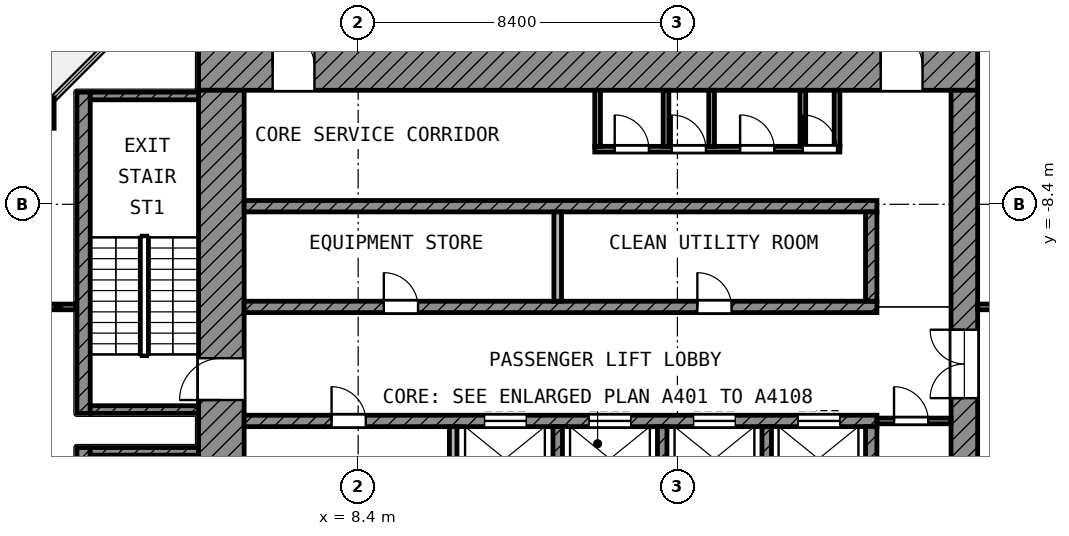
"""IFC4 building model, lengths in metres.
Left out: names, types, materials, properties, quantities, classifications, styles, units other than length and angle.
Written with IfcOpenShell. Run it as: python <this file> out.ifc"""

import sys

from ifc_helpers import new_model, si_unit, direction, frame, frame_2d, origin, origin_2d, place, context, subcontext, project, spatial, rectangle, extrude, element, fill, save


model = new_model("IFC4")
c1 = context("Model", 3, precision=1e-05, world=origin(), true_north=direction((0.0, 1.0)))
c2 = subcontext(c1, "Body", "Model", "MODEL_VIEW")
j1 = project(units=[si_unit("LENGTHUNIT", "METRE"), si_unit("PLANEANGLEUNIT", "RADIAN")], contexts=[c1])
p1 = place(None, origin())
s1 = spatial("IfcSite", under=j1, at=p1, CompositionType="ELEMENT")
p2 = place(p1, origin())
s2 = spatial("IfcBuilding", under=s1, at=p2, CompositionType="ELEMENT")
p3 = place(p2, frame((0.0, 0.0, 319.6)))
s3 = spatial("IfcBuildingStorey", under=s2, at=p3, CompositionType="ELEMENT", Elevation=319.6)
p4 = place(p3, frame((0.0, -6.0, 0.0), z_axis=(0.0, 0.0, 1.0), x_axis=(1.0, 0.0, 0.0)))
e1 = element("IfcColumn", 1, at=p4, inside=s3, PredefinedType="COLUMN", context=c2, shape_type="SweptSolid", body=[
    extrude(rectangle(XDim=0.8, YDim=0.8, at=origin_2d()), origin(), (0.0, 0.0, 1.0), 4.2),
])
p5 = place(p3, frame((4.2, -4.8, 0.0), z_axis=(0.0, 0.0, 1.0), x_axis=(1.0, 0.0, 0.0)))
e2 = element("IfcWall", 2, at=p5, inside=s3, PredefinedType="SHEAR", context=c2, shape_type="SweptSolid", body=[
    extrude(rectangle(XDim=20.5, YDim=1.2, at=frame_2d((10.25, 0.0))), origin(), (0.0, 0.0, 1.0), 3.6),
])
p6 = place(p5, frame((1.95, 0.0, 0.0)))
e3 = element("IfcOpeningElement", 3, at=p6, cuts=e2, PredefinedType="OPENING", context=c2, shape_type="SweptSolid", body=[
    extrude(rectangle(XDim=1.1, YDim=2.1, at=frame_2d((0.55, 1.05))), frame((0.0, 0.61, 0.0), z_axis=(0.0, -1.0, 0.0), x_axis=(1.0, 0.0, 0.0)), (0.0, 0.0, 1.0), 1.22),
])
p7 = place(p5, frame((17.95, 0.0, 0.0)))
e4 = element("IfcOpeningElement", 4, at=p7, cuts=e2, PredefinedType="OPENING", context=c2, shape_type="SweptSolid", body=[
    extrude(rectangle(XDim=1.1, YDim=2.1, at=frame_2d((0.55, 1.05))), frame((0.0, 0.61, 0.0), z_axis=(0.0, -1.0, 0.0), x_axis=(1.0, 0.0, 0.0)), (0.0, 0.0, 1.0), 1.22),
])
p8 = place(p3, frame((4.8, -24.7, 0.0), z_axis=(0.0, 0.0, 1.0), x_axis=(0.0, 1.0, 0.0)))
e5 = element("IfcWall", 5, at=p8, inside=s3, PredefinedType="SHEAR", context=c2, shape_type="SweptSolid", body=[
    extrude(rectangle(XDim=19.3, YDim=1.2, at=frame_2d((9.65, 0.0))), origin(), (0.0, 0.0, 1.0), 3.6),
])
p9 = place(p8, frame((11.15, 0.0, 0.0)))
e6 = element("IfcOpeningElement", 6, at=p9, cuts=e5, PredefinedType="OPENING", context=c2, shape_type="SweptSolid", body=[
    extrude(rectangle(XDim=1.1, YDim=2.1, at=frame_2d((0.55, 1.05))), frame((0.0, 0.61, 0.0), z_axis=(0.0, -1.0, 0.0), x_axis=(1.0, 0.0, 0.0)), (0.0, 0.0, 1.0), 1.22),
])
p10 = place(p8, frame((1.85, 0.0, 0.0)))
e7 = element("IfcOpeningElement", 7, at=p10, cuts=e5, PredefinedType="OPENING", context=c2, shape_type="SweptSolid", body=[
    extrude(rectangle(XDim=1.1, YDim=2.1, at=frame_2d((0.55, 1.05))), frame((0.0, 0.61, 0.0), z_axis=(0.0, -1.0, 0.0), x_axis=(1.0, 0.0, 0.0)), (0.0, 0.0, 1.0), 1.22),
])
p11 = place(p3, frame((24.35, -24.0, 0.0), z_axis=(0.0, 0.0, 1.0), x_axis=(0.0, 1.0, 0.0)))
e8 = element("IfcWall", 8, at=p11, inside=s3, PredefinedType="SHEAR", context=c2, shape_type="SweptSolid", body=[
    extrude(rectangle(XDim=18.6, YDim=0.7, at=frame_2d((9.3, 0.0))), origin(), (0.0, 0.0, 1.0), 3.6),
])
p12 = place(p11, frame((10.5, 0.0, 0.0)))
e9 = element("IfcOpeningElement", 9, at=p12, cuts=e8, PredefinedType="OPENING", context=c2, shape_type="SweptSolid", body=[
    extrude(rectangle(XDim=1.8, YDim=2.1, at=frame_2d((0.9, 1.05))), frame((0.0, 0.36, 0.0), z_axis=(0.0, -1.0, 0.0), x_axis=(1.0, 0.0, 0.0)), (0.0, 0.0, 1.0), 0.72),
])
p13 = place(p3, frame((5.4, -8.45, 0.0), z_axis=(0.0, 0.0, 1.0), x_axis=(1.0, 0.0, 0.0)))
e10 = element("IfcWall", 10, at=p13, inside=s3, PredefinedType="SHEAR", context=c2, shape_type="SweptSolid", body=[
    extrude(rectangle(XDim=16.65, YDim=0.3, at=frame_2d((8.325, 0.0))), origin(), (0.0, 0.0, 1.0), 3.6),
])
p14 = place(p3, frame((5.4, -11.1, 0.0), z_axis=(0.0, 0.0, 1.0), x_axis=(1.0, 0.0, 0.0)))
e11 = element("IfcWall", 11, at=p14, inside=s3, PredefinedType="SHEAR", context=c2, shape_type="SweptSolid", body=[
    extrude(rectangle(XDim=16.65, YDim=0.3, at=frame_2d((8.325, 0.0))), origin(), (0.0, 0.0, 1.0), 3.6),
])
p15 = place(p14, frame((3.675, 0.0, 0.0)))
e12 = element("IfcOpeningElement", 12, at=p15, cuts=e11, PredefinedType="OPENING", context=c2, shape_type="SweptSolid", body=[
    extrude(rectangle(XDim=0.9, YDim=2.1, at=frame_2d((0.45, 1.05))), frame((0.0, 0.16, 0.0), z_axis=(0.0, -1.0, 0.0), x_axis=(1.0, 0.0, 0.0)), (0.0, 0.0, 1.0), 0.32),
])
p16 = place(p14, frame((11.925, 0.0, 0.0)))
e13 = element("IfcOpeningElement", 13, at=p16, cuts=e11, PredefinedType="OPENING", context=c2, shape_type="SweptSolid", body=[
    extrude(rectangle(XDim=0.9, YDim=2.1, at=frame_2d((0.45, 1.05))), frame((0.0, 0.16, 0.0), z_axis=(0.0, -1.0, 0.0), x_axis=(1.0, 0.0, 0.0)), (0.0, 0.0, 1.0), 0.32),
])
p17 = place(p3, frame((5.4, -14.1, 0.0), z_axis=(0.0, 0.0, 1.0), x_axis=(1.0, 0.0, 0.0)))
e14 = element("IfcWall", 14, at=p17, inside=s3, PredefinedType="SHEAR", context=c2, shape_type="SweptSolid", body=[
    extrude(rectangle(XDim=16.65, YDim=0.3, at=frame_2d((8.325, 0.0))), origin(), (0.0, 0.0, 1.0), 3.6),
])
p18 = place(p17, frame((6.325, 0.0, 0.0)))
e15 = element("IfcOpeningElement", 15, at=p18, cuts=e14, PredefinedType="OPENING", context=c2, shape_type="SweptSolid", body=[
    extrude(rectangle(XDim=1.1, YDim=2.1, at=frame_2d((0.55, 1.05))), frame((0.0, 0.16, 0.0), z_axis=(0.0, -1.0, 0.0), x_axis=(1.0, 0.0, 0.0)), (0.0, 0.0, 1.0), 0.32),
])
p19 = place(p17, frame((9.075, 0.0, 0.0)))
e16 = element("IfcOpeningElement", 16, at=p19, cuts=e14, PredefinedType="OPENING", context=c2, shape_type="SweptSolid", body=[
    extrude(rectangle(XDim=1.1, YDim=2.1, at=frame_2d((0.55, 1.05))), frame((0.0, 0.16, 0.0), z_axis=(0.0, -1.0, 0.0), x_axis=(1.0, 0.0, 0.0)), (0.0, 0.0, 1.0), 0.32),
])
p20 = place(p17, frame((11.825, 0.0, 0.0)))
e17 = element("IfcOpeningElement", 17, at=p20, cuts=e14, PredefinedType="OPENING", context=c2, shape_type="SweptSolid", body=[
    extrude(rectangle(XDim=1.1, YDim=2.1, at=frame_2d((0.55, 1.05))), frame((0.0, 0.16, 0.0), z_axis=(0.0, -1.0, 0.0), x_axis=(1.0, 0.0, 0.0)), (0.0, 0.0, 1.0), 0.32),
])
p21 = place(p17, frame((14.575, 0.0, 0.0)))
e18 = element("IfcOpeningElement", 18, at=p21, cuts=e14, PredefinedType="OPENING", context=c2, shape_type="SweptSolid", body=[
    extrude(rectangle(XDim=1.1, YDim=2.1, at=frame_2d((0.55, 1.05))), frame((0.0, 0.16, 0.0), z_axis=(0.0, -1.0, 0.0), x_axis=(1.0, 0.0, 0.0)), (0.0, 0.0, 1.0), 0.32),
])
p22 = place(p17, frame((2.3, 0.0, 0.0)))
e19 = element("IfcOpeningElement", 19, at=p22, cuts=e14, PredefinedType="OPENING", context=c2, shape_type="SweptSolid", body=[
    extrude(rectangle(XDim=0.9, YDim=2.1, at=frame_2d((0.45, 1.05))), frame((0.0, 0.16, 0.0), z_axis=(0.0, -1.0, 0.0), x_axis=(1.0, 0.0, 0.0)), (0.0, 0.0, 1.0), 0.32),
])
p23 = place(p3, frame((21.9, -10.95, 0.0), z_axis=(0.0, 0.0, 1.0), x_axis=(0.0, 1.0, 0.0)))
e20 = element("IfcWall", 20, at=p23, inside=s3, PredefinedType="SHEAR", context=c2, shape_type="SweptSolid", body=[
    extrude(rectangle(XDim=2.35, YDim=0.3, at=frame_2d((1.175, 0.0))), origin(), (0.0, 0.0, 1.0), 3.6),
])
p24 = place(p3, frame((21.9, -16.6, 0.0), z_axis=(0.0, 0.0, 1.0), x_axis=(0.0, 1.0, 0.0)))
e21 = element("IfcWall", 21, at=p24, inside=s3, PredefinedType="SHEAR", context=c2, shape_type="SweptSolid", body=[
    extrude(rectangle(XDim=2.35, YDim=0.3, at=frame_2d((1.175, 0.0))), origin(), (0.0, 0.0, 1.0), 3.6),
])
p25 = place(p3, frame((13.65, -10.95, 0.0), z_axis=(0.0, 0.0, 1.0), x_axis=(0.0, 1.0, 0.0)))
e22 = element("IfcWall", 22, at=p25, inside=s3, PredefinedType="PARTITIONING", context=c2, shape_type="SweptSolid", body=[
    extrude(rectangle(XDim=2.35, YDim=0.2, at=frame_2d((1.175, 0.0))), origin(), (0.0, 0.0, 1.0), 3.6),
])
p26 = place(p3, frame((10.9, -16.6, 0.0), z_axis=(0.0, 0.0, 1.0), x_axis=(0.0, 1.0, 0.0)))
e23 = element("IfcWall", 23, at=p26, inside=s3, PredefinedType="PARTITIONING", context=c2, shape_type="SweptSolid", body=[
    extrude(rectangle(XDim=2.35, YDim=0.2, at=frame_2d((1.175, 0.0))), origin(), (0.0, 0.0, 1.0), 3.6),
])
for number, where, z_axis, x_axis in (
    (24, (13.65, -16.6, 0.0), (0.0, 0.0, 1.0), (0.0, 1.0, 0.0)),
    (25, (16.4, -16.6, 0.0), (0.0, 0.0, 1.0), (0.0, 1.0, 0.0)),
    (26, (19.15, -16.6, 0.0), (0.0, 0.0, 1.0), (0.0, 1.0, 0.0)),
):
    element("IfcWall", number, at=place(p3, frame(where, z_axis=z_axis, x_axis=x_axis)), inside=s3, PredefinedType="SHEAR", context=c2, shape_type="SweptSolid", body=[
        extrude(rectangle(XDim=2.35, YDim=0.25, at=frame_2d((1.175, 0.0))), origin(), (0.0, 0.0, 1.0), 3.6),
    ])
p27 = place(p3, frame((22.05, -14.1, 0.0), z_axis=(0.0, 0.0, 1.0), x_axis=(1.0, 0.0, 0.0)))
e27 = element("IfcWall", 27, at=p27, inside=s3, PredefinedType="PARTITIONING", context=c2, shape_type="SweptSolid", body=[
    extrude(rectangle(XDim=1.95, YDim=0.15, at=frame_2d((0.975, 0.0))), origin(), (0.0, 0.0, 1.0), 3.6),
])
p28 = place(p27, frame((0.45, 0.0, 0.0)))
e28 = element("IfcOpeningElement", 28, at=p28, cuts=e27, PredefinedType="OPENING", context=c2, shape_type="SweptSolid", body=[
    extrude(rectangle(XDim=0.9, YDim=2.1, at=frame_2d((0.45, 1.05))), frame((0.0, 0.085, 0.0), z_axis=(0.0, -1.0, 0.0), x_axis=(1.0, 0.0, 0.0)), (0.0, 0.0, 1.0), 0.17),
])
p29 = place(p3, frame((14.625, -6.95, 0.0), z_axis=(0.0, 0.0, 1.0), x_axis=(1.0, 0.0, 0.0)))
e29 = element("IfcWall", 29, at=p29, inside=s3, PredefinedType="PARTITIONING", context=c2, shape_type="SweptSolid", body=[
    extrude(rectangle(XDim=6.45, YDim=0.15, at=frame_2d((3.225, 0.0))), origin(), (0.0, 0.0, 1.0), 3.6),
])
p30 = place(p29, frame((0.525, 0.0, 0.0)))
e30 = element("IfcOpeningElement", 30, at=p30, cuts=e29, PredefinedType="OPENING", context=c2, shape_type="SweptSolid", body=[
    extrude(rectangle(XDim=0.9, YDim=2.1, at=frame_2d((0.45, 1.05))), frame((0.0, 0.085, 0.0), z_axis=(0.0, -1.0, 0.0), x_axis=(1.0, 0.0, 0.0)), (0.0, 0.0, 1.0), 0.17),
])
p31 = place(p29, frame((2.025, 0.0, 0.0)))
e31 = element("IfcOpeningElement", 31, at=p31, cuts=e29, PredefinedType="OPENING", context=c2, shape_type="SweptSolid", body=[
    extrude(rectangle(XDim=0.9, YDim=2.1, at=frame_2d((0.45, 1.05))), frame((0.0, 0.085, 0.0), z_axis=(0.0, -1.0, 0.0), x_axis=(1.0, 0.0, 0.0)), (0.0, 0.0, 1.0), 0.17),
])
p32 = place(p29, frame((3.825, 0.0, 0.0)))
e32 = element("IfcOpeningElement", 32, at=p32, cuts=e29, PredefinedType="OPENING", context=c2, shape_type="SweptSolid", body=[
    extrude(rectangle(XDim=0.9, YDim=2.1, at=frame_2d((0.45, 1.05))), frame((0.0, 0.085, 0.0), z_axis=(0.0, -1.0, 0.0), x_axis=(1.0, 0.0, 0.0)), (0.0, 0.0, 1.0), 0.17),
])
p33 = place(p29, frame((5.475, 0.0, 0.0)))
e33 = element("IfcOpeningElement", 33, at=p33, cuts=e29, PredefinedType="OPENING", context=c2, shape_type="SweptSolid", body=[
    extrude(rectangle(XDim=0.9, YDim=2.1, at=frame_2d((0.45, 1.05))), frame((0.0, 0.085, 0.0), z_axis=(0.0, -1.0, 0.0), x_axis=(1.0, 0.0, 0.0)), (0.0, 0.0, 1.0), 0.17),
])
for number, where, z_axis, x_axis in (
    (34, (14.7, -6.875, 0.0), (0.0, 0.0, 1.0), (0.0, 1.0, 0.0)),
    (35, (16.5, -6.875, 0.0), (0.0, 0.0, 1.0), (0.0, 1.0, 0.0)),
    (36, (17.7, -6.875, 0.0), (0.0, 0.0, 1.0), (0.0, 1.0, 0.0)),
    (37, (20.1, -6.875, 0.0), (0.0, 0.0, 1.0), (0.0, 1.0, 0.0)),
    (38, (21.0, -6.875, 0.0), (0.0, 0.0, 1.0), (0.0, 1.0, 0.0)),
):
    element("IfcWall", number, at=place(p3, frame(where, z_axis=z_axis, x_axis=x_axis)), inside=s3, PredefinedType="PARTITIONING", context=c2, shape_type="SweptSolid", body=[
        extrude(rectangle(XDim=1.475, YDim=0.15, at=frame_2d((0.738, 0.0))), origin(), (0.0, 0.0, 1.0), 3.6),
    ])
p34 = place(p3, frame((1.175, -13.9, 0.0), z_axis=(0.0, 0.0, 1.0), x_axis=(0.0, 1.0, 0.0)))
e39 = element("IfcWall", 39, at=p34, inside=s3, PredefinedType="SHEAR", context=c2, shape_type="SweptSolid", body=[
    extrude(rectangle(XDim=8.45, YDim=0.35, at=frame_2d((4.225, 0.0))), origin(), (0.0, 0.0, 1.0), 3.6),
])
for number, where, z_axis, x_axis in (
    (40, (1.35, -5.55, 0.0), (0.0, 0.0, 1.0), (1.0, 0.0, 0.0)),
    (41, (1.35, -13.8, 0.0), (0.0, 0.0, 1.0), (1.0, 0.0, 0.0)),
):
    element("IfcWall", number, at=place(p3, frame(where, z_axis=z_axis, x_axis=x_axis)), inside=s3, PredefinedType="SHEAR", context=c2, shape_type="SweptSolid", body=[
        extrude(rectangle(XDim=2.85, YDim=0.2, at=frame_2d((1.425, 0.0))), origin(), (0.0, 0.0, 1.0), 3.6),
    ])
p35 = place(p3, frame((1.175, -23.25, 0.0), z_axis=(0.0, 0.0, 1.0), x_axis=(0.0, 1.0, 0.0)))
e42 = element("IfcWall", 42, at=p35, inside=s3, PredefinedType="SHEAR", context=c2, shape_type="SweptSolid", body=[
    extrude(rectangle(XDim=8.45, YDim=0.35, at=frame_2d((4.225, 0.0))), origin(), (0.0, 0.0, 1.0), 3.6),
])
p36 = place(p3, frame((1.35, -14.9, 0.0), z_axis=(0.0, 0.0, 1.0), x_axis=(1.0, 0.0, 0.0)))
e43 = element("IfcWall", 43, at=p36, inside=s3, PredefinedType="SHEAR", context=c2, shape_type="SweptSolid", body=[
    extrude(rectangle(XDim=2.85, YDim=0.2, at=frame_2d((1.425, 0.0))), origin(), (0.0, 0.0, 1.0), 3.6),
])
p37 = place(p3, frame((0.08, -11.1, 0.0), z_axis=(0.0, 0.0, 1.0), x_axis=(1.0, 0.0, 0.0)))
e44 = element("IfcWall", 44, at=p37, inside=s3, PredefinedType="PARTITIONING", context=c2, shape_type="SweptSolid", body=[
    extrude(rectangle(XDim=0.89, YDim=0.15, at=frame_2d((0.445, 0.0))), origin(), (0.0, 0.0, 1.0), 2.7),
])
p38 = place(p3, frame((24.7, -11.1, 0.0), z_axis=(0.0, 0.0, 1.0), x_axis=(1.0, 0.0, 0.0)))
e45 = element("IfcWall", 45, at=p38, inside=s3, PredefinedType="PARTITIONING", context=c2, shape_type="SweptSolid", body=[
    extrude(rectangle(XDim=4.625, YDim=0.15, at=frame_2d((2.312, 0.0))), origin(), (0.0, 0.0, 1.0), 3.6),
])
p39 = place(p38, frame((2.0, 0.0, 0.0)))
e46 = element("IfcOpeningElement", 46, at=p39, cuts=e45, PredefinedType="OPENING", context=c2, shape_type="SweptSolid", body=[
    extrude(rectangle(XDim=1.2, YDim=2.1, at=frame_2d((0.6, 1.05))), frame((0.0, 0.085, 0.0), z_axis=(0.0, -1.0, 0.0), x_axis=(1.0, 0.0, 0.0)), (0.0, 0.0, 1.0), 0.17),
])
p40 = place(p18, origin())
e47 = element("IfcDoor", 47, at=p40, inside=s3, OperationType="DOUBLE_DOOR_SLIDING", PredefinedType="DOOR", context=c2, shape_type="SweptSolid", body=[
    extrude(rectangle(XDim=1.1, YDim=2.1, at=frame_2d((0.55, 1.05))), frame((0.0, 0.025, 0.0), z_axis=(0.0, -1.0, 0.0), x_axis=(1.0, 0.0, 0.0)), (0.0, 0.0, 1.0), 0.05),
])
fill(e15, e47)
p41 = place(p19, origin())
e48 = element("IfcDoor", 48, at=p41, inside=s3, OperationType="DOUBLE_DOOR_SLIDING", PredefinedType="DOOR", context=c2, shape_type="SweptSolid", body=[
    extrude(rectangle(XDim=1.1, YDim=2.1, at=frame_2d((0.55, 1.05))), frame((0.0, 0.025, 0.0), z_axis=(0.0, -1.0, 0.0), x_axis=(1.0, 0.0, 0.0)), (0.0, 0.0, 1.0), 0.05),
])
fill(e16, e48)
p42 = place(p20, origin())
e49 = element("IfcDoor", 49, at=p42, inside=s3, OperationType="DOUBLE_DOOR_SLIDING", PredefinedType="DOOR", context=c2, shape_type="SweptSolid", body=[
    extrude(rectangle(XDim=1.1, YDim=2.1, at=frame_2d((0.55, 1.05))), frame((0.0, 0.025, 0.0), z_axis=(0.0, -1.0, 0.0), x_axis=(1.0, 0.0, 0.0)), (0.0, 0.0, 1.0), 0.05),
])
fill(e17, e49)
p43 = place(p21, origin())
e50 = element("IfcDoor", 50, at=p43, inside=s3, OperationType="DOUBLE_DOOR_SLIDING", PredefinedType="DOOR", context=c2, shape_type="SweptSolid", body=[
    extrude(rectangle(XDim=1.1, YDim=2.1, at=frame_2d((0.55, 1.05))), frame((0.0, 0.025, 0.0), z_axis=(0.0, -1.0, 0.0), x_axis=(1.0, 0.0, 0.0)), (0.0, 0.0, 1.0), 0.05),
])
fill(e18, e50)
p44 = place(p9, origin())
e51 = element("IfcDoor", 51, at=p44, inside=s3, OperationType="SINGLE_SWING_LEFT", PredefinedType="DOOR", context=c2, shape_type="SweptSolid", body=[
    extrude(rectangle(XDim=1.1, YDim=2.1, at=frame_2d((0.55, 1.05))), frame((0.0, 0.025, 0.0), z_axis=(0.0, -1.0, 0.0), x_axis=(1.0, 0.0, 0.0)), (0.0, 0.0, 1.0), 0.05),
])
fill(e6, e51)
p45 = place(p6, origin())
e52 = element("IfcDoor", 52, at=p45, inside=s3, OperationType="SINGLE_SWING_LEFT", PredefinedType="DOOR", context=c2, shape_type="SweptSolid", body=[
    extrude(rectangle(XDim=1.1, YDim=2.1, at=frame_2d((0.55, 1.05))), frame((0.0, 0.025, 0.0), z_axis=(0.0, -1.0, 0.0), x_axis=(1.0, 0.0, 0.0)), (0.0, 0.0, 1.0), 0.05),
])
fill(e3, e52)
p46 = place(p7, origin())
e53 = element("IfcDoor", 53, at=p46, inside=s3, OperationType="SINGLE_SWING_LEFT", PredefinedType="DOOR", context=c2, shape_type="SweptSolid", body=[
    extrude(rectangle(XDim=1.1, YDim=2.1, at=frame_2d((0.55, 1.05))), frame((0.0, 0.025, 0.0), z_axis=(0.0, -1.0, 0.0), x_axis=(1.0, 0.0, 0.0)), (0.0, 0.0, 1.0), 0.05),
])
fill(e4, e53)
p47 = place(p12, origin())
e54 = element("IfcDoor", 54, at=p47, inside=s3, OperationType="DOUBLE_DOOR_SINGLE_SWING", PredefinedType="DOOR", context=c2, shape_type="SweptSolid", body=[
    extrude(rectangle(XDim=1.8, YDim=2.1, at=frame_2d((0.9, 1.05))), frame((0.0, 0.025, 0.0), z_axis=(0.0, -1.0, 0.0), x_axis=(1.0, 0.0, 0.0)), (0.0, 0.0, 1.0), 0.05),
])
fill(e9, e54)
p48 = place(p30, origin())
e55 = element("IfcDoor", 55, at=p48, inside=s3, OperationType="SINGLE_SWING_LEFT", PredefinedType="DOOR", context=c2, shape_type="SweptSolid", body=[
    extrude(rectangle(XDim=0.9, YDim=2.1, at=frame_2d((0.45, 1.05))), frame((0.0, 0.025, 0.0), z_axis=(0.0, -1.0, 0.0), x_axis=(1.0, 0.0, 0.0)), (0.0, 0.0, 1.0), 0.05),
])
fill(e30, e55)
p49 = place(p31, origin())
e56 = element("IfcDoor", 56, at=p49, inside=s3, OperationType="SINGLE_SWING_LEFT", PredefinedType="DOOR", context=c2, shape_type="SweptSolid", body=[
    extrude(rectangle(XDim=0.9, YDim=2.1, at=frame_2d((0.45, 1.05))), frame((0.0, 0.025, 0.0), z_axis=(0.0, -1.0, 0.0), x_axis=(1.0, 0.0, 0.0)), (0.0, 0.0, 1.0), 0.05),
])
fill(e31, e56)
p50 = place(p32, origin())
e57 = element("IfcDoor", 57, at=p50, inside=s3, OperationType="SINGLE_SWING_LEFT", PredefinedType="DOOR", context=c2, shape_type="SweptSolid", body=[
    extrude(rectangle(XDim=0.9, YDim=2.1, at=frame_2d((0.45, 1.05))), frame((0.0, 0.025, 0.0), z_axis=(0.0, -1.0, 0.0), x_axis=(1.0, 0.0, 0.0)), (0.0, 0.0, 1.0), 0.05),
])
fill(e32, e57)
p51 = place(p33, origin())
e58 = element("IfcDoor", 58, at=p51, inside=s3, OperationType="SINGLE_SWING_LEFT", PredefinedType="DOOR", context=c2, shape_type="SweptSolid", body=[
    extrude(rectangle(XDim=0.9, YDim=2.1, at=frame_2d((0.45, 1.05))), frame((0.0, 0.025, 0.0), z_axis=(0.0, -1.0, 0.0), x_axis=(1.0, 0.0, 0.0)), (0.0, 0.0, 1.0), 0.05),
])
fill(e33, e58)
p52 = place(p28, origin())
e59 = element("IfcDoor", 59, at=p52, inside=s3, OperationType="SINGLE_SWING_LEFT", PredefinedType="DOOR", context=c2, shape_type="SweptSolid", body=[
    extrude(rectangle(XDim=0.9, YDim=2.1, at=frame_2d((0.45, 1.05))), frame((0.0, 0.025, 0.0), z_axis=(0.0, -1.0, 0.0), x_axis=(1.0, 0.0, 0.0)), (0.0, 0.0, 1.0), 0.05),
])
fill(e28, e59)
p53 = place(p15, origin())
e60 = element("IfcDoor", 60, at=p53, inside=s3, OperationType="SINGLE_SWING_LEFT", PredefinedType="DOOR", context=c2, shape_type="SweptSolid", body=[
    extrude(rectangle(XDim=0.9, YDim=2.1, at=frame_2d((0.45, 1.05))), frame((0.0, 0.025, 0.0), z_axis=(0.0, -1.0, 0.0), x_axis=(1.0, 0.0, 0.0)), (0.0, 0.0, 1.0), 0.05),
])
fill(e12, e60)
p54 = place(p16, origin())
e61 = element("IfcDoor", 61, at=p54, inside=s3, OperationType="SINGLE_SWING_LEFT", PredefinedType="DOOR", context=c2, shape_type="SweptSolid", body=[
    extrude(rectangle(XDim=0.9, YDim=2.1, at=frame_2d((0.45, 1.05))), frame((0.0, 0.025, 0.0), z_axis=(0.0, -1.0, 0.0), x_axis=(1.0, 0.0, 0.0)), (0.0, 0.0, 1.0), 0.05),
])
fill(e13, e61)
p55 = place(p22, origin())
e62 = element("IfcDoor", 62, at=p55, inside=s3, OperationType="SINGLE_SWING_LEFT", PredefinedType="DOOR", context=c2, shape_type="SweptSolid", body=[
    extrude(rectangle(XDim=0.9, YDim=2.1, at=frame_2d((0.45, 1.05))), frame((0.0, 0.025, 0.0), z_axis=(0.0, -1.0, 0.0), x_axis=(1.0, 0.0, 0.0)), (0.0, 0.0, 1.0), 0.05),
])
fill(e19, e62)
save(model, sys.argv[1])
